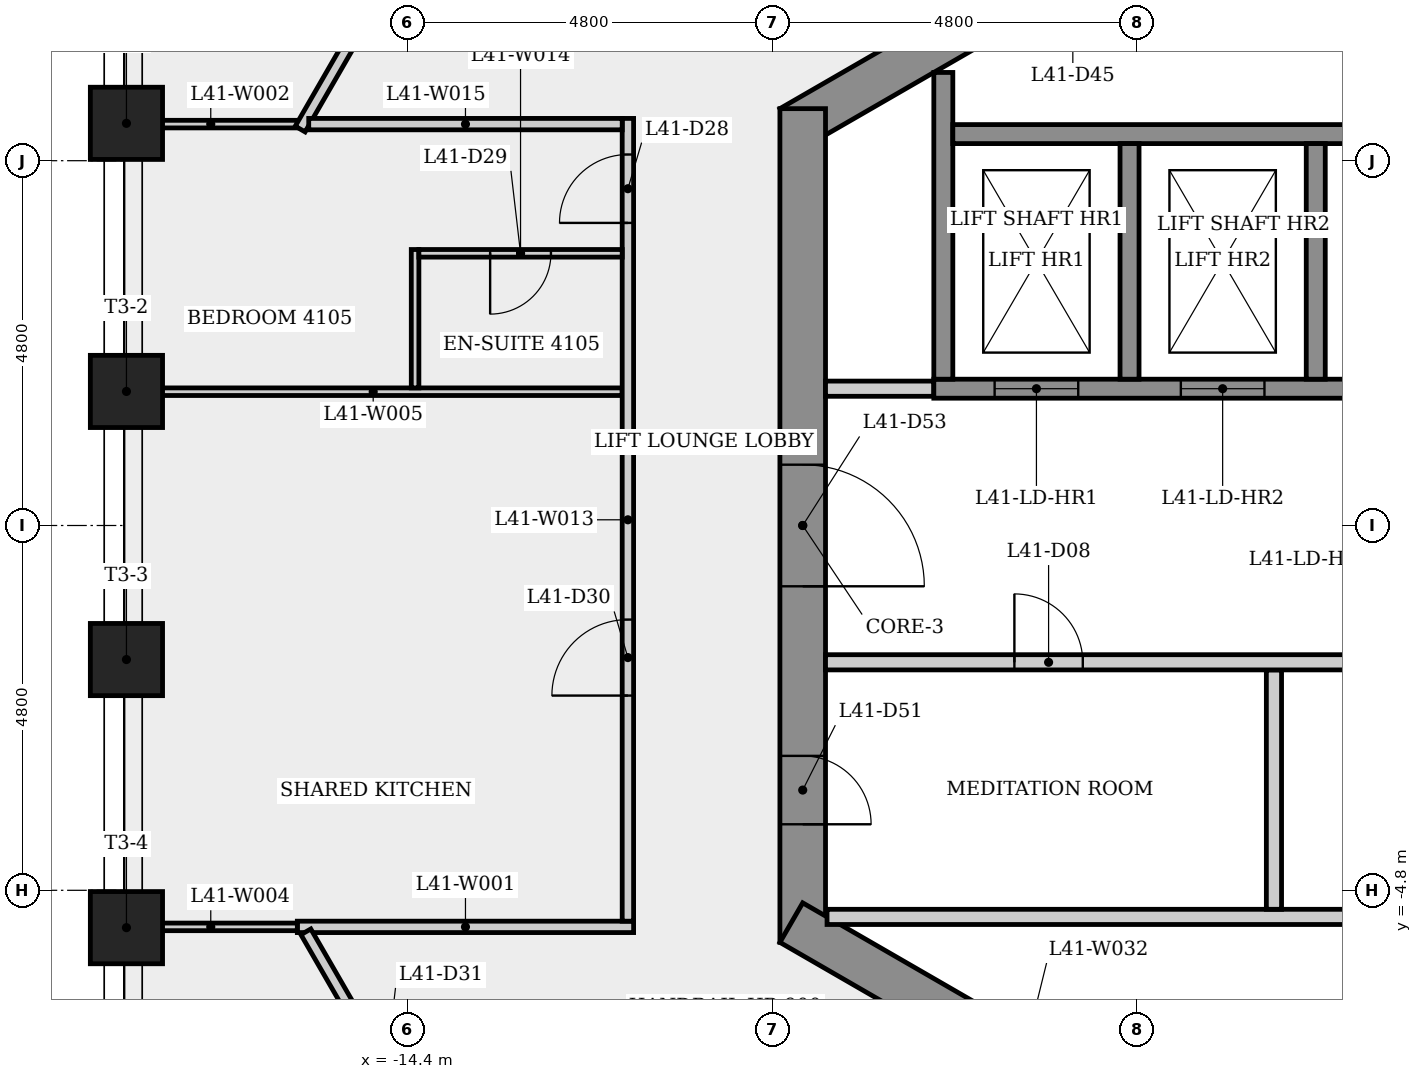
"""IFC4 building model, lengths in metres.
Left out: names, types, materials, properties, quantities, classifications, styles, units other than length and angle.
Written with IfcOpenShell. Run it as: python <this file> out.ifc"""

import sys

from ifc_helpers import new_model, si_unit, direction, frame, frame_2d, origin, origin_2d, place, context, subcontext, project, spatial, rectangle, extrude, element, fill, save


model = new_model("IFC4")
c1 = context("Model", 3, precision=1e-05, world=origin(), true_north=direction((0.0, 1.0)))
c2 = subcontext(c1, "Body", "Model", "MODEL_VIEW")
j1 = project(units=[si_unit("LENGTHUNIT", "METRE"), si_unit("PLANEANGLEUNIT", "RADIAN")], contexts=[c1])
p1 = place(None, origin())
s1 = spatial("IfcSite", under=j1, at=p1, CompositionType="ELEMENT")
p2 = place(p1, origin())
s2 = spatial("IfcBuilding", under=s1, at=p2, CompositionType="ELEMENT")
p3 = place(p2, frame((0.0, 0.0, 156.1)))
s3 = spatial("IfcBuildingStorey", under=s2, at=p3, CompositionType="ELEMENT", Elevation=156.1)
p4 = place(p3, frame((0.15, 10.71, 0.0), z_axis=(0.0, 0.0, 1.0), x_axis=(-0.866023993627, -0.500002442456, 0.0)))
e1 = element("IfcWall", 1, at=p4, inside=s3, PredefinedType="SHEAR", context=c2, shape_type="SweptSolid", body=[
    extrude(rectangle(XDim=10.97, YDim=0.6, at=frame_2d((5.485, 0.0))), origin(), (0.0, 0.0, 1.0), 3.4),
])
p5 = place(p4, frame((6.243, 0.0, 0.0)))
e2 = element("IfcOpeningElement", 2, at=p5, cuts=e1, PredefinedType="OPENING", context=c2, shape_type="SweptSolid", body=[
    extrude(rectangle(XDim=0.9, YDim=2.1, at=frame_2d((0.45, 1.05))), frame((0.0, 0.31, 0.0), z_axis=(0.0, -1.0, 0.0), x_axis=(1.0, 0.0, 0.0)), (0.0, 0.0, 1.0), 0.62),
])
p6 = place(p3, frame((-9.2, 5.485, 0.0), z_axis=(0.0, 0.0, 1.0), x_axis=(0.0, -1.0, 0.0)))
e3 = element("IfcWall", 3, at=p6, inside=s3, PredefinedType="SHEAR", context=c2, shape_type="SweptSolid", body=[
    extrude(rectangle(XDim=10.97, YDim=0.6, at=frame_2d((5.485, 0.0))), origin(), (0.0, 0.0, 1.0), 3.4),
])
p7 = place(p6, frame((8.516, 0.0, 0.0)))
e4 = element("IfcOpeningElement", 4, at=p7, cuts=e3, PredefinedType="OPENING", context=c2, shape_type="SweptSolid", body=[
    extrude(rectangle(XDim=0.9, YDim=2.1, at=frame_2d((0.45, 1.05))), frame((0.0, 0.31, 0.0), z_axis=(0.0, -1.0, 0.0), x_axis=(1.0, 0.0, 0.0)), (0.0, 0.0, 1.0), 0.62),
])
p8 = place(p6, frame((4.685, 0.0, 0.0)))
e5 = element("IfcOpeningElement", 5, at=p8, cuts=e3, PredefinedType="OPENING", context=c2, shape_type="SweptSolid", body=[
    extrude(rectangle(XDim=1.6, YDim=2.1, at=frame_2d((0.8, 1.05))), frame((0.0, 0.31, 0.0), z_axis=(0.0, -1.0, 0.0), x_axis=(1.0, 0.0, 0.0)), (0.0, 0.0, 1.0), 0.62),
])
p9 = place(p3, frame((-9.35, -5.225, 0.0), z_axis=(0.0, 0.0, 1.0), x_axis=(0.866023993627, -0.500002442456, 0.0)))
e6 = element("IfcWall", 6, at=p9, inside=s3, PredefinedType="SHEAR", context=c2, shape_type="SweptSolid", body=[
    extrude(rectangle(XDim=10.97, YDim=0.6, at=frame_2d((5.485, 0.0))), origin(), (0.0, 0.0, 1.0), 3.4),
])
p10 = place(p9, frame((4.816, 0.0, 0.0)))
e7 = element("IfcOpeningElement", 7, at=p10, cuts=e6, PredefinedType="OPENING", context=c2, shape_type="SweptSolid", body=[
    extrude(rectangle(XDim=0.9, YDim=2.1, at=frame_2d((0.45, 1.05))), frame((0.0, 0.31, 0.0), z_axis=(0.0, -1.0, 0.0), x_axis=(1.0, 0.0, 0.0)), (0.0, 0.0, 1.0), 0.62),
])
for number, where, z_axis, x_axis in (
    (8, (-18.097, 5.292, 0.0), (0.0, 0.0, 1.0), (-1.0, 0.0, 0.0)),
    (9, (-18.097, 1.764, 0.0), (0.0, 0.0, 1.0), (-1.0, 0.0, 0.0)),
    (10, (-18.097, -1.764, 0.0), (0.0, 0.0, 1.0), (-1.0, 0.0, 0.0)),
    (11, (-18.097, -5.292, 0.0), (0.0, 0.0, 1.0), (-1.0, 0.0, 0.0)),
):
    element("IfcColumn", number, at=place(p3, frame(where, z_axis=z_axis, x_axis=x_axis)), inside=s3, PredefinedType="COLUMN", context=c2, shape_type="SweptSolid", body=[
        extrude(rectangle(XDim=0.95, YDim=0.95, at=origin_2d()), origin(), (0.0, 0.0, 1.0), 3.4),
    ])
p11 = place(p3, frame((-15.849, -5.281, 0.0), z_axis=(0.0, 0.0, 1.0), x_axis=(1.0, 0.0, 0.0)))
e12 = element("IfcWall", 12, at=p11, inside=s3, PredefinedType="PARTITIONING", context=c2, shape_type="SweptSolid", body=[
    extrude(rectangle(XDim=4.425, YDim=0.15, at=frame_2d((2.212, 0.0))), origin(), (0.0, 0.0, 1.0), 3.05),
])
p12 = place(p3, frame((-15.849, 5.281, 0.0), z_axis=(0.0, 0.0, 1.0), x_axis=(-1.0, 0.0, 0.0)))
e13 = element("IfcWall", 13, at=p12, inside=s3, PredefinedType="PARTITIONING", context=c2, shape_type="SweptSolid", body=[
    extrude(rectangle(XDim=2.278, YDim=0.1, at=frame_2d((1.139, 0.0))), origin(), (0.0, 0.0, 1.0), 3.05),
])
p13 = place(p3, frame((-15.812, 5.216, 0.0), z_axis=(0.0, 0.0, 1.0), x_axis=(0.50000019414, 0.866025291697, 0.0)))
e14 = element("IfcWall", 14, at=p13, inside=s3, PredefinedType="PARTITIONING", context=c2, shape_type="SweptSolid", body=[
    extrude(rectangle(XDim=6.848, YDim=0.15, at=frame_2d((3.424, 0.0))), origin(), (0.0, 0.0, 1.0), 3.05),
])
p14 = place(p13, frame((2.924, 0.0, 0.0)))
e15 = element("IfcOpeningElement", 15, at=p14, cuts=e14, PredefinedType="OPENING", context=c2, shape_type="SweptSolid", body=[
    extrude(rectangle(XDim=1.0, YDim=2.1, at=frame_2d((0.5, 1.05))), frame((0.0, 0.085, 0.0), z_axis=(0.0, -1.0, 0.0), x_axis=(1.0, 0.0, 0.0)), (0.0, 0.0, 1.0), 0.17),
])
p15 = place(p3, frame((-15.849, -5.281, 0.0), z_axis=(0.0, 0.0, 1.0), x_axis=(-1.0, 0.0, 0.0)))
e16 = element("IfcWall", 16, at=p15, inside=s3, PredefinedType="PARTITIONING", context=c2, shape_type="SweptSolid", body=[
    extrude(rectangle(XDim=2.278, YDim=0.1, at=frame_2d((1.139, 0.0))), origin(), (0.0, 0.0, 1.0), 3.05),
])
p16 = place(p3, frame((-18.127, 1.76, 0.0), z_axis=(0.0, 0.0, 1.0), x_axis=(1.0, 0.0, 0.0)))
e17 = element("IfcWall", 17, at=p16, inside=s3, PredefinedType="PARTITIONING", context=c2, shape_type="SweptSolid", body=[
    extrude(rectangle(XDim=6.552, YDim=0.1, at=frame_2d((3.276, 0.0))), origin(), (0.0, 0.0, 1.0), 3.05),
])
p17 = place(p3, frame((-14.3, 3.631, 0.0), z_axis=(0.0, 0.0, 1.0), x_axis=(0.0, -1.0, 0.0)))
e18 = element("IfcWall", 18, at=p17, inside=s3, PredefinedType="PARTITIONING", context=c2, shape_type="SweptSolid", body=[
    extrude(rectangle(XDim=1.821, YDim=0.1, at=frame_2d((0.911, 0.0))), origin(), (0.0, 0.0, 1.0), 3.05),
])
p18 = place(p3, frame((-13.631, -8.993, 0.0), z_axis=(0.0, 0.0, 1.0), x_axis=(-0.499998449073, 0.866026299211, 0.0)))
e19 = element("IfcWall", 19, at=p18, inside=s3, PredefinedType="PARTITIONING", context=c2, shape_type="SweptSolid", body=[
    extrude(rectangle(XDim=4.211, YDim=0.15, at=frame_2d((2.106, 0.0))), origin(), (0.0, 0.0, 1.0), 3.05),
])
p19 = place(p18, frame((1.606, 0.0, 0.0)))
e20 = element("IfcOpeningElement", 20, at=p19, cuts=e19, PredefinedType="OPENING", context=c2, shape_type="SweptSolid", body=[
    extrude(rectangle(XDim=1.0, YDim=2.1, at=frame_2d((0.5, 1.05))), frame((0.0, 0.085, 0.0), z_axis=(0.0, -1.0, 0.0), x_axis=(1.0, 0.0, 0.0)), (0.0, 0.0, 1.0), 0.17),
])
p20 = place(p3, frame((-11.5, -5.206, 0.0), z_axis=(0.0, 0.0, 1.0), x_axis=(0.0, 1.0, 0.0)))
e21 = element("IfcWall", 21, at=p20, inside=s3, PredefinedType="PARTITIONING", context=c2, shape_type="SweptSolid", body=[
    extrude(rectangle(XDim=10.562, YDim=0.15, at=frame_2d((5.281, 0.0))), origin(), (0.0, 0.0, 1.0), 3.05),
])
p21 = place(p20, frame((9.188, 0.0, 0.0)))
e22 = element("IfcOpeningElement", 22, at=p21, cuts=e21, PredefinedType="OPENING", context=c2, shape_type="SweptSolid", body=[
    extrude(rectangle(XDim=0.9, YDim=2.1, at=frame_2d((0.45, 1.05))), frame((0.0, 0.085, 0.0), z_axis=(0.0, -1.0, 0.0), x_axis=(1.0, 0.0, 0.0)), (0.0, 0.0, 1.0), 0.17),
])
p22 = place(p20, frame((2.969, 0.0, 0.0)))
e23 = element("IfcOpeningElement", 23, at=p22, cuts=e21, PredefinedType="OPENING", context=c2, shape_type="SweptSolid", body=[
    extrude(rectangle(XDim=1.0, YDim=2.1, at=frame_2d((0.5, 1.05))), frame((0.0, 0.085, 0.0), z_axis=(0.0, -1.0, 0.0), x_axis=(1.0, 0.0, 0.0)), (0.0, 0.0, 1.0), 0.17),
])
p23 = place(p3, frame((-11.575, 3.581, 0.0), z_axis=(0.0, 0.0, 1.0), x_axis=(-1.0, 0.0, 0.0)))
e24 = element("IfcWall", 24, at=p23, inside=s3, PredefinedType="PARTITIONING", context=c2, shape_type="SweptSolid", body=[
    extrude(rectangle(XDim=2.675, YDim=0.1, at=frame_2d((1.337, 0.0))), origin(), (0.0, 0.0, 1.0), 3.05),
])
p24 = place(p23, frame((0.938, 0.0, 0.0)))
e25 = element("IfcOpeningElement", 25, at=p24, cuts=e24, PredefinedType="OPENING", context=c2, shape_type="SweptSolid", body=[
    extrude(rectangle(XDim=0.8, YDim=2.1, at=frame_2d((0.4, 1.05))), frame((0.0, 0.06, 0.0), z_axis=(0.0, -1.0, 0.0), x_axis=(1.0, 0.0, 0.0)), (0.0, 0.0, 1.0), 0.12),
])
p25 = place(p3, frame((-11.575, 5.281, 0.0), z_axis=(0.0, 0.0, 1.0), x_axis=(-1.0, 0.0, 0.0)))
e26 = element("IfcWall", 26, at=p25, inside=s3, PredefinedType="PARTITIONING", context=c2, shape_type="SweptSolid", body=[
    extrude(rectangle(XDim=4.124, YDim=0.15, at=frame_2d((2.062, 0.0))), origin(), (0.0, 0.0, 1.0), 3.05),
])
p26 = place(p3, frame((-8.9, 1.8, 0.0), z_axis=(0.0, 0.0, 1.0), x_axis=(1.0, 0.0, 0.0)))
e27 = element("IfcWall", 27, at=p26, inside=s3, PredefinedType="PARTITIONING", context=c2, shape_type="SweptSolid", body=[
    extrude(rectangle(XDim=1.425, YDim=0.2, at=frame_2d((0.712, 0.0))), origin(), (0.0, 0.0, 1.0), 3.05),
])
p27 = place(p3, frame((-8.88, -5.15, 0.0), z_axis=(0.0, 0.0, 1.0), x_axis=(1.0, 0.0, 0.0)))
e28 = element("IfcWall", 28, at=p27, inside=s3, PredefinedType="PARTITIONING", context=c2, shape_type="SweptSolid", body=[
    extrude(rectangle(XDim=11.205, YDim=0.2, at=frame_2d((5.603, 0.0))), origin(), (0.0, 0.0, 1.0), 3.05),
])
p28 = place(p3, frame((-7.475, 1.8, 0.0), z_axis=(0.0, 0.0, 1.0), x_axis=(1.0, 0.0, 0.0)))
e29 = element("IfcWall", 29, at=p28, inside=s3, PredefinedType="SHEAR", context=c2, shape_type="SweptSolid", body=[
    extrude(rectangle(XDim=14.95, YDim=0.25, at=frame_2d((7.475, 0.0))), origin(), (0.0, 0.0, 1.0), 3.05),
])
p29 = place(p28, frame((0.8, 0.0, 0.0)))
e30 = element("IfcOpeningElement", 30, at=p29, cuts=e29, PredefinedType="OPENING", context=c2, shape_type="SweptSolid", body=[
    extrude(rectangle(XDim=1.1, YDim=2.1, at=frame_2d((0.55, 1.05))), frame((0.0, 0.135, 0.0), z_axis=(0.0, -1.0, 0.0), x_axis=(1.0, 0.0, 0.0)), (0.0, 0.0, 1.0), 0.27),
])
p30 = place(p28, frame((3.25, 0.0, 0.0)))
e31 = element("IfcOpeningElement", 31, at=p30, cuts=e29, PredefinedType="OPENING", context=c2, shape_type="SweptSolid", body=[
    extrude(rectangle(XDim=1.1, YDim=2.1, at=frame_2d((0.55, 1.05))), frame((0.0, 0.135, 0.0), z_axis=(0.0, -1.0, 0.0), x_axis=(1.0, 0.0, 0.0)), (0.0, 0.0, 1.0), 0.27),
])
p31 = place(p28, frame((5.7, 0.0, 0.0)))
e32 = element("IfcOpeningElement", 32, at=p31, cuts=e29, PredefinedType="OPENING", context=c2, shape_type="SweptSolid", body=[
    extrude(rectangle(XDim=1.1, YDim=2.1, at=frame_2d((0.55, 1.05))), frame((0.0, 0.135, 0.0), z_axis=(0.0, -1.0, 0.0), x_axis=(1.0, 0.0, 0.0)), (0.0, 0.0, 1.0), 0.27),
])
p32 = place(p28, frame((8.15, 0.0, 0.0)))
e33 = element("IfcOpeningElement", 33, at=p32, cuts=e29, PredefinedType="OPENING", context=c2, shape_type="SweptSolid", body=[
    extrude(rectangle(XDim=1.1, YDim=2.1, at=frame_2d((0.55, 1.05))), frame((0.0, 0.135, 0.0), z_axis=(0.0, -1.0, 0.0), x_axis=(1.0, 0.0, 0.0)), (0.0, 0.0, 1.0), 0.27),
])
p33 = place(p28, frame((10.6, 0.0, 0.0)))
e34 = element("IfcOpeningElement", 34, at=p33, cuts=e29, PredefinedType="OPENING", context=c2, shape_type="SweptSolid", body=[
    extrude(rectangle(XDim=1.1, YDim=2.1, at=frame_2d((0.55, 1.05))), frame((0.0, 0.135, 0.0), z_axis=(0.0, -1.0, 0.0), x_axis=(1.0, 0.0, 0.0)), (0.0, 0.0, 1.0), 0.27),
])
p34 = place(p28, frame((13.05, 0.0, 0.0)))
e35 = element("IfcOpeningElement", 35, at=p34, cuts=e29, PredefinedType="OPENING", context=c2, shape_type="SweptSolid", body=[
    extrude(rectangle(XDim=1.1, YDim=2.1, at=frame_2d((0.55, 1.05))), frame((0.0, 0.135, 0.0), z_axis=(0.0, -1.0, 0.0), x_axis=(1.0, 0.0, 0.0)), (0.0, 0.0, 1.0), 0.27),
])
p35 = place(p3, frame((-7.35, 1.925, 0.0), z_axis=(0.0, 0.0, 1.0), x_axis=(0.0, 1.0, 0.0)))
e36 = element("IfcWall", 36, at=p35, inside=s3, PredefinedType="SHEAR", context=c2, shape_type="SweptSolid", body=[
    extrude(rectangle(XDim=4.036, YDim=0.25, at=frame_2d((2.018, 0.0))), origin(), (0.0, 0.0, 1.0), 3.05),
])
p36 = place(p3, frame((-7.225, 5.15, 0.0), z_axis=(0.0, 0.0, 1.0), x_axis=(1.0, 0.0, 0.0)))
e37 = element("IfcWall", 37, at=p36, inside=s3, PredefinedType="SHEAR", context=c2, shape_type="SweptSolid", body=[
    extrude(rectangle(XDim=14.7, YDim=0.25, at=frame_2d((7.35, 0.0))), origin(), (0.0, 0.0, 1.0), 3.05),
])
p37 = place(p3, frame((-4.9, 5.025, 0.0), z_axis=(0.0, 0.0, 1.0), x_axis=(0.0, -1.0, 0.0)))
e38 = element("IfcWall", 38, at=p37, inside=s3, PredefinedType="SHEAR", context=c2, shape_type="SweptSolid", body=[
    extrude(rectangle(XDim=3.1, YDim=0.25, at=frame_2d((1.55, 0.0))), origin(), (0.0, 0.0, 1.0), 3.4),
])
p38 = place(p3, frame((-3.0, -1.9, 0.0), z_axis=(0.0, 0.0, 1.0), x_axis=(0.0, -1.0, 0.0)))
e39 = element("IfcWall", 39, at=p38, inside=s3, PredefinedType="PARTITIONING", context=c2, shape_type="SweptSolid", body=[
    extrude(rectangle(XDim=3.15, YDim=0.2, at=frame_2d((1.575, 0.0))), origin(), (0.0, 0.0, 1.0), 3.05),
])
p39 = place(p3, frame((-8.9, -1.8, 0.0), z_axis=(0.0, 0.0, 1.0), x_axis=(1.0, 0.0, 0.0)))
e40 = element("IfcWall", 40, at=p39, inside=s3, PredefinedType="PARTITIONING", context=c2, shape_type="SweptSolid", body=[
    extrude(rectangle(XDim=11.225, YDim=0.2, at=frame_2d((5.613, 0.0))), origin(), (0.0, 0.0, 1.0), 3.05),
])
p40 = place(p39, frame((2.485, 0.0, 0.0)))
e41 = element("IfcOpeningElement", 41, at=p40, cuts=e40, PredefinedType="OPENING", context=c2, shape_type="SweptSolid", body=[
    extrude(rectangle(XDim=0.9, YDim=2.1, at=frame_2d((0.45, 1.05))), frame((0.0, 0.11, 0.0), z_axis=(0.0, -1.0, 0.0), x_axis=(1.0, 0.0, 0.0)), (0.0, 0.0, 1.0), 0.22),
])
p41 = place(p39, frame((8.387, 0.0, 0.0)))
e42 = element("IfcOpeningElement", 42, at=p41, cuts=e40, PredefinedType="OPENING", context=c2, shape_type="SweptSolid", body=[
    extrude(rectangle(XDim=0.9, YDim=2.1, at=frame_2d((0.45, 1.05))), frame((0.0, 0.11, 0.0), z_axis=(0.0, -1.0, 0.0), x_axis=(1.0, 0.0, 0.0)), (0.0, 0.0, 1.0), 0.22),
])
p42 = place(p3, frame((-2.45, 5.025, 0.0), z_axis=(0.0, 0.0, 1.0), x_axis=(0.0, -1.0, 0.0)))
e43 = element("IfcWall", 43, at=p42, inside=s3, PredefinedType="SHEAR", context=c2, shape_type="SweptSolid", body=[
    extrude(rectangle(XDim=3.1, YDim=0.25, at=frame_2d((1.55, 0.0))), origin(), (0.0, 0.0, 1.0), 3.4),
])
p43 = place(p29, origin())
e44 = element("IfcDoor", 44, at=p43, inside=s3, OperationType="SLIDING_TO_LEFT", PredefinedType="DOOR", context=c2, shape_type="SweptSolid", body=[
    extrude(rectangle(XDim=1.1, YDim=2.1, at=frame_2d((0.55, 1.05))), frame((0.0, 0.025, 0.0), z_axis=(0.0, -1.0, 0.0), x_axis=(1.0, 0.0, 0.0)), (0.0, 0.0, 1.0), 0.05),
])
fill(e30, e44)
p44 = place(p30, origin())
e45 = element("IfcDoor", 45, at=p44, inside=s3, OperationType="SLIDING_TO_LEFT", PredefinedType="DOOR", context=c2, shape_type="SweptSolid", body=[
    extrude(rectangle(XDim=1.1, YDim=2.1, at=frame_2d((0.55, 1.05))), frame((0.0, 0.025, 0.0), z_axis=(0.0, -1.0, 0.0), x_axis=(1.0, 0.0, 0.0)), (0.0, 0.0, 1.0), 0.05),
])
fill(e31, e45)
p45 = place(p40, origin())
e46 = element("IfcDoor", 46, at=p45, inside=s3, OperationType="SINGLE_SWING_LEFT", PredefinedType="DOOR", context=c2, shape_type="SweptSolid", body=[
    extrude(rectangle(XDim=0.9, YDim=2.1, at=frame_2d((0.45, 1.05))), frame((0.0, 0.025, 0.0), z_axis=(0.0, -1.0, 0.0), x_axis=(1.0, 0.0, 0.0)), (0.0, 0.0, 1.0), 0.05),
])
fill(e41, e46)
p46 = place(p21, origin())
e47 = element("IfcDoor", 47, at=p46, inside=s3, OperationType="SINGLE_SWING_LEFT", PredefinedType="DOOR", context=c2, shape_type="SweptSolid", body=[
    extrude(rectangle(XDim=0.9, YDim=2.1, at=frame_2d((0.45, 1.05))), frame((0.0, 0.025, 0.0), z_axis=(0.0, -1.0, 0.0), x_axis=(1.0, 0.0, 0.0)), (0.0, 0.0, 1.0), 0.05),
])
fill(e22, e47)
p47 = place(p24, origin())
e48 = element("IfcDoor", 48, at=p47, inside=s3, OperationType="SINGLE_SWING_RIGHT", PredefinedType="DOOR", context=c2, shape_type="SweptSolid", body=[
    extrude(rectangle(XDim=0.8, YDim=2.1, at=frame_2d((0.4, 1.05))), frame((0.0, 0.025, 0.0), z_axis=(0.0, -1.0, 0.0), x_axis=(1.0, 0.0, 0.0)), (0.0, 0.0, 1.0), 0.05),
])
fill(e25, e48)
p48 = place(p22, origin())
e49 = element("IfcDoor", 49, at=p48, inside=s3, OperationType="SINGLE_SWING_LEFT", PredefinedType="DOOR", context=c2, shape_type="SweptSolid", body=[
    extrude(rectangle(XDim=1.0, YDim=2.1, at=frame_2d((0.5, 1.05))), frame((0.0, 0.025, 0.0), z_axis=(0.0, -1.0, 0.0), x_axis=(1.0, 0.0, 0.0)), (0.0, 0.0, 1.0), 0.05),
])
fill(e23, e49)
p49 = place(p7, origin())
e50 = element("IfcDoor", 50, at=p49, inside=s3, OperationType="SINGLE_SWING_RIGHT", PredefinedType="DOOR", context=c2, shape_type="SweptSolid", body=[
    extrude(rectangle(XDim=0.9, YDim=2.1, at=frame_2d((0.45, 1.05))), frame((0.0, 0.025, 0.0), z_axis=(0.0, -1.0, 0.0), x_axis=(1.0, 0.0, 0.0)), (0.0, 0.0, 1.0), 0.05),
])
fill(e4, e50)
p50 = place(p8, origin())
e51 = element("IfcDoor", 51, at=p50, inside=s3, OperationType="SINGLE_SWING_RIGHT", PredefinedType="DOOR", context=c2, shape_type="SweptSolid", body=[
    extrude(rectangle(XDim=1.6, YDim=2.1, at=frame_2d((0.8, 1.05))), frame((0.0, 0.025, 0.0), z_axis=(0.0, -1.0, 0.0), x_axis=(1.0, 0.0, 0.0)), (0.0, 0.0, 1.0), 0.05),
])
fill(e5, e51)
save(model, sys.argv[1])
